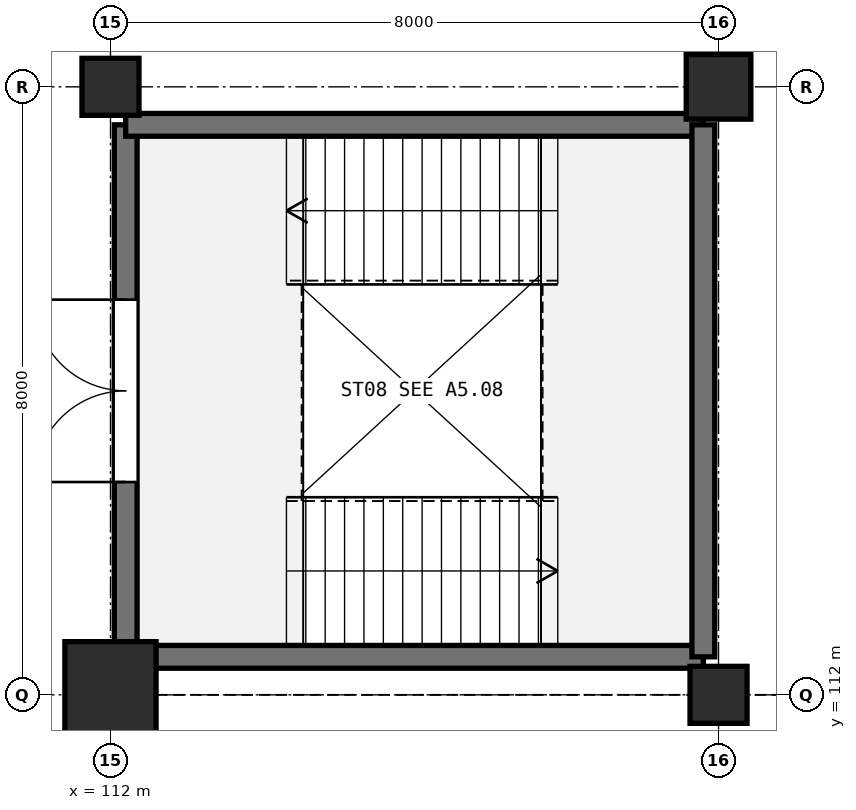
"""IFC4 building model, lengths in metres.
Left out: names, types, materials, properties, quantities, classifications, styles, units other than length and angle.
Written with IfcOpenShell. Run it as: python <this file> out.ifc"""

import sys

from ifc_helpers import new_model, si_unit, direction, frame, frame_2d, origin, origin_2d, place, context, subcontext, project, spatial, rectangle, extrude, element, fill, save


model = new_model("IFC4")
c1 = context("Model", 3, precision=1e-05, world=origin(), true_north=direction((0.0, 1.0)))
c2 = subcontext(c1, "Body", "Model", "MODEL_VIEW")
j1 = project(units=[si_unit("LENGTHUNIT", "METRE"), si_unit("PLANEANGLEUNIT", "RADIAN")], contexts=[c1])
p1 = place(None, origin())
s1 = spatial("IfcSite", under=j1, at=p1, CompositionType="ELEMENT")
p2 = place(p1, origin())
s2 = spatial("IfcBuilding", under=s1, at=p2, CompositionType="ELEMENT")
p3 = place(p2, origin())
s3 = spatial("IfcBuildingStorey", under=s2, at=p3, CompositionType="ELEMENT", Elevation=0.0)
p4 = place(p3, frame((112.0, 112.0, 0.0), z_axis=(0.0, 0.0, 1.0), x_axis=(1.0, 0.0, 0.0)))
e1 = element("IfcColumn", 1, at=p4, inside=s3, PredefinedType="COLUMN", context=c2, shape_type="SweptSolid", body=[
    extrude(rectangle(XDim=1.2, YDim=1.4, at=origin_2d()), origin(), (0.0, 0.0, 1.0), 5.4),
])
for number, where, z_axis, x_axis in (
    (2, (112.0, 120.0, 0.0), (0.0, 0.0, 1.0), (1.0, 0.0, 0.0)),
    (3, (120.0, 112.0, 0.0), (0.0, 0.0, 1.0), (1.0, 0.0, 0.0)),
):
    element("IfcColumn", number, at=place(p3, frame(where, z_axis=z_axis, x_axis=x_axis)), inside=s3, PredefinedType="COLUMN", context=c2, shape_type="SweptSolid", body=[
        extrude(rectangle(XDim=0.75, YDim=0.75, at=origin_2d()), origin(), (0.0, 0.0, 1.0), 5.4),
    ])
p5 = place(p3, frame((120.0, 120.0, 0.0), z_axis=(0.0, 0.0, 1.0), x_axis=(1.0, 0.0, 0.0)))
e4 = element("IfcColumn", 4, at=p5, inside=s3, PredefinedType="COLUMN", context=c2, shape_type="SweptSolid", body=[
    extrude(rectangle(XDim=0.85, YDim=0.85, at=origin_2d()), origin(), (0.0, 0.0, 1.0), 5.4),
])
p6 = place(p3, frame((119.8, 112.5, 0.0), z_axis=(0.0, 0.0, 1.0), x_axis=(-1.0, 0.0, 0.0)))
e5 = element("IfcWall", 5, at=p6, inside=s3, PredefinedType="SHEAR", context=c2, shape_type="SweptSolid", body=[
    extrude(rectangle(XDim=7.6, YDim=0.3, at=frame_2d((3.8, 0.0))), origin(), (0.0, 0.0, 1.0), 5.08),
])
p7 = place(p3, frame((112.2, 112.5, 0.0), z_axis=(0.0, 0.0, 1.0), x_axis=(0.0, 1.0, 0.0)))
e6 = element("IfcWall", 6, at=p7, inside=s3, PredefinedType="SHEAR", context=c2, shape_type="SweptSolid", body=[
    extrude(rectangle(XDim=7.0, YDim=0.3, at=frame_2d((3.5, 0.0))), origin(), (0.0, 0.0, 1.0), 5.08),
])
p8 = place(p7, frame((2.3, 0.0, 0.0)))
e7 = element("IfcOpeningElement", 7, at=p8, cuts=e6, PredefinedType="OPENING", context=c2, shape_type="SweptSolid", body=[
    extrude(rectangle(XDim=2.4, YDim=2.2, at=frame_2d((1.2, 1.1))), frame((0.0, 0.16, 0.0), z_axis=(0.0, -1.0, 0.0), x_axis=(1.0, 0.0, 0.0)), (0.0, 0.0, 1.0), 0.32),
])
p9 = place(p3, frame((112.2, 119.5, 0.0), z_axis=(0.0, 0.0, 1.0), x_axis=(1.0, 0.0, 0.0)))
e8 = element("IfcWall", 8, at=p9, inside=s3, PredefinedType="SHEAR", context=c2, shape_type="SweptSolid", body=[
    extrude(rectangle(XDim=7.6, YDim=0.3, at=frame_2d((3.8, 0.0))), origin(), (0.0, 0.0, 1.0), 5.08),
])
p10 = place(p3, frame((119.8, 119.5, 0.0), z_axis=(0.0, 0.0, 1.0), x_axis=(0.0, -1.0, 0.0)))
e9 = element("IfcWall", 9, at=p10, inside=s3, PredefinedType="SHEAR", context=c2, shape_type="SweptSolid", body=[
    extrude(rectangle(XDim=7.0, YDim=0.3, at=frame_2d((3.5, 0.0))), origin(), (0.0, 0.0, 1.0), 5.08),
])
p11 = place(p8, origin())
e10 = element("IfcDoor", 10, at=p11, inside=s3, OperationType="DOUBLE_DOOR_SINGLE_SWING", PredefinedType="DOOR", context=c2, shape_type="SweptSolid", body=[
    extrude(rectangle(XDim=2.4, YDim=2.2, at=frame_2d((1.2, 1.1))), frame((0.0, 0.025, 0.0), z_axis=(0.0, -1.0, 0.0), x_axis=(1.0, 0.0, 0.0)), (0.0, 0.0, 1.0), 0.05),
])
fill(e7, e10)
save(model, sys.argv[1])
